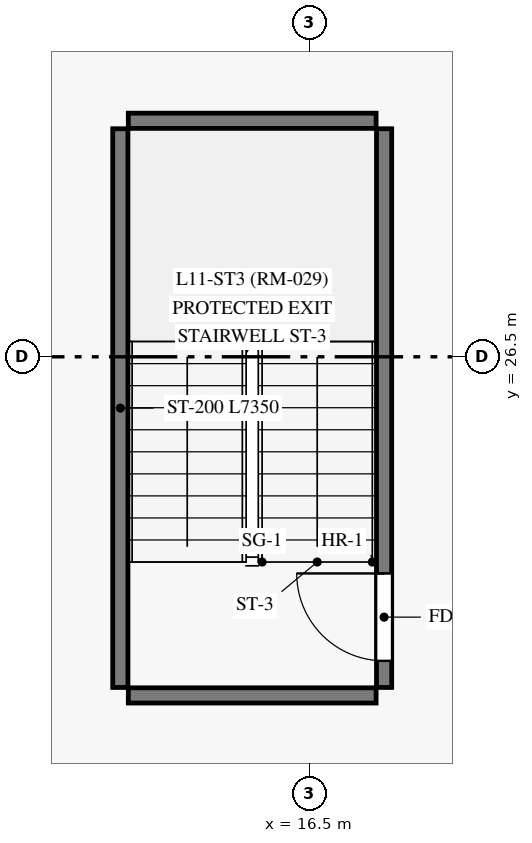
"""IFC4 building model, lengths in metres.
Left out: names, types, materials, properties, quantities, classifications, styles, units other than length and angle.
Written with IfcOpenShell. Run it as: python <this file> out.ifc"""

import sys

from ifc_helpers import new_model, si_unit, direction, frame, frame_2d, origin, origin_with_axes, place, context, subcontext, project, spatial, rectangle, extrude, source, transform, mapped, element, fill, save


model = new_model("IFC4")
c1 = context("Model", 3, precision=1e-05, world=origin(), true_north=direction((0.0, 1.0)))
c2 = subcontext(c1, "Body", "Model", "MODEL_VIEW")
j1 = project(units=[si_unit("LENGTHUNIT", "METRE"), si_unit("PLANEANGLEUNIT", "RADIAN")], contexts=[c1])
p1 = place(None, origin())
s1 = spatial("IfcSite", under=j1, at=p1, CompositionType="ELEMENT")
p2 = place(p1, origin())
s2 = spatial("IfcBuilding", under=s1, at=p2, CompositionType="ELEMENT")
p3 = place(p2, frame((0.0, 0.0, 44.5)))
s3 = spatial("IfcBuildingStorey", under=s2, at=p3, CompositionType="ELEMENT", Elevation=44.5)
p4 = place(p3, frame((14.015, 22.15, 0.0), z_axis=(0.0, 0.0, 1.0), x_axis=(0.0, 1.0, 0.0)))
e1 = element("IfcWall", 1, at=p4, inside=s3, PredefinedType="SHEAR", context=c2, shape_type="SweptSolid", body=[
    extrude(rectangle(XDim=7.35, YDim=0.2, at=frame_2d((3.675, 0.0))), origin(), (0.0, 0.0, 1.0), 3.35),
])
p5 = place(p3, frame((17.485, 22.15, 0.0), z_axis=(0.0, 0.0, 1.0), x_axis=(0.0, 1.0, 0.0)))
e2 = element("IfcWall", 2, at=p5, inside=s3, PredefinedType="SHEAR", context=c2, shape_type="SweptSolid", body=[
    extrude(rectangle(XDim=7.35, YDim=0.2, at=frame_2d((3.675, 0.0))), origin(), (0.0, 0.0, 1.0), 3.35),
])
p6 = place(p5, frame((0.35, 0.0, 0.0)))
e3 = element("IfcOpeningElement", 3, at=p6, cuts=e2, PredefinedType="OPENING", context=c2, shape_type="SweptSolid", body=[
    extrude(rectangle(XDim=1.15, YDim=2.15, at=frame_2d((0.575, 1.075))), frame((0.0, 0.11, 0.0), z_axis=(0.0, -1.0, 0.0), x_axis=(1.0, 0.0, 0.0)), (0.0, 0.0, 1.0), 0.22),
])
for number, where, z_axis, x_axis in (
    (4, (14.12, 22.045, 0.0), (0.0, 0.0, 1.0), (1.0, 0.0, 0.0)),
    (5, (14.12, 29.605, 0.0), (0.0, 0.0, 1.0), (1.0, 0.0, 0.0)),
):
    element("IfcWall", number, at=place(p3, frame(where, z_axis=z_axis, x_axis=x_axis)), inside=s3, PredefinedType="SHEAR", context=c2, shape_type="SweptSolid", body=[
        extrude(rectangle(XDim=3.26, YDim=0.2, at=frame_2d((1.63, 0.0))), origin(), (0.0, 0.0, 1.0), 3.35),
    ])
m1 = source(origin_with_axes(), c2, "Body", "SweptSolid", [
    extrude(rectangle(XDim=1.15, YDim=2.15, at=frame_2d((0.575, 1.075))), frame((0.0, 0.025, 0.0), z_axis=(0.0, -1.0, 0.0), x_axis=(1.0, 0.0, 0.0)), (0.0, 0.0, 1.0), 0.05),
])
p7 = place(p6, origin())
e6 = element("IfcDoor", 6, at=p7, inside=s3, OperationType="SINGLE_SWING_RIGHT", PredefinedType="DOOR", context=c2, shape_type="MappedRepresentation", body=[
    mapped(m1, transform((0.0, 0.0, 0.0), scale=1.0)),
])
fill(e3, e6)
save(model, sys.argv[1])
